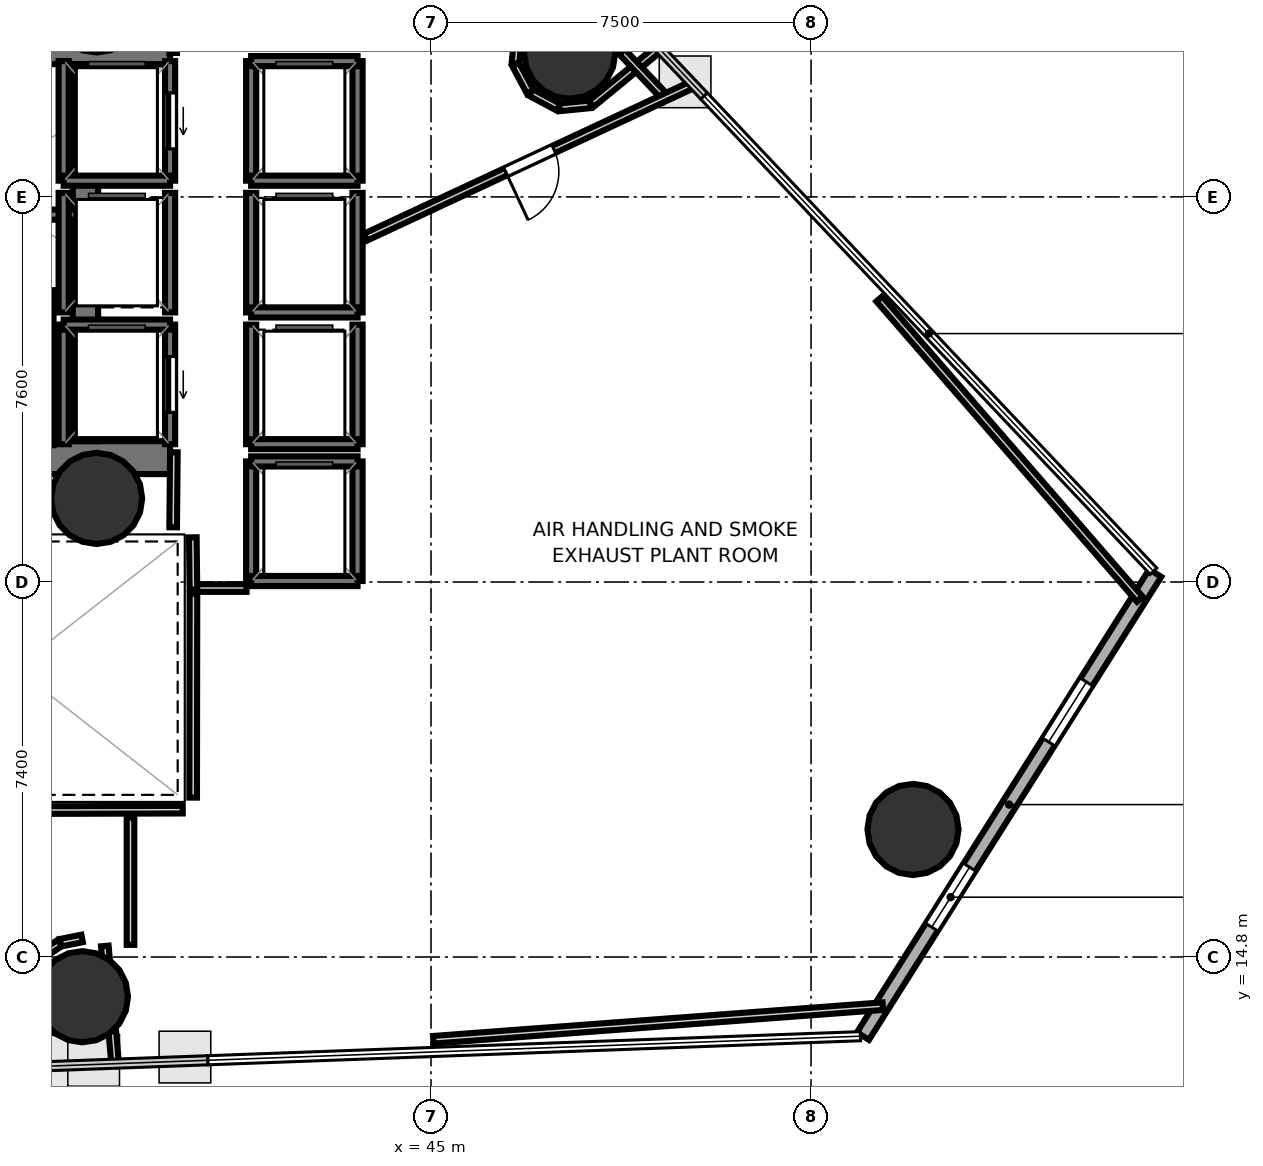
"""IFC4 building model, lengths in metres.
Left out: names, types, materials, properties, quantities, classifications, styles, units other than length and angle.
Written with IfcOpenShell. Run it as: python <this file> out.ifc"""

import sys

from ifc_helpers import new_model, si_unit, direction, frame, frame_2d, origin, origin_2d, place, context, subcontext, project, spatial, rectangle, hollow_circle, extrude, element, fill, save


model = new_model("IFC4")
c1 = context("Model", 3, precision=1e-05, world=origin(), true_north=direction((0.0, 1.0)))
c2 = subcontext(c1, "Body", "Model", "MODEL_VIEW")
j1 = project(units=[si_unit("LENGTHUNIT", "METRE"), si_unit("PLANEANGLEUNIT", "RADIAN")], contexts=[c1])
p1 = place(None, origin())
s1 = spatial("IfcSite", under=j1, at=p1, CompositionType="ELEMENT")
p2 = place(p1, origin())
s2 = spatial("IfcBuilding", under=s1, at=p2, CompositionType="ELEMENT")
p3 = place(p2, frame((0.0, 0.0, 47.9)))
s3 = spatial("IfcBuildingStorey", under=s2, at=p3, CompositionType="ELEMENT", Elevation=47.9)
p4 = place(p3, frame((29.13, 32.745, 0.0), z_axis=(0.0, 0.0, 1.0), x_axis=(1.0, 0.0, 0.0)))
e1 = element("IfcWall", 1, at=p4, inside=s3, PredefinedType="SHEAR", context=c2, shape_type="SweptSolid", body=[
    extrude(rectangle(XDim=10.72, YDim=0.65, at=frame_2d((5.36, 0.0))), origin(), (0.0, 0.0, 1.0), 4.42),
])
p5 = place(p4, frame((1.095, 0.0, 0.0)))
e2 = element("IfcOpeningElement", 2, at=p5, cuts=e1, PredefinedType="OPENING", context=c2, shape_type="SweptSolid", body=[
    extrude(rectangle(XDim=1.25, YDim=2.15, at=frame_2d((0.625, 1.075))), frame((0.0, 0.335, 0.0), z_axis=(0.0, -1.0, 0.0), x_axis=(1.0, 0.0, 0.0)), (0.0, 0.0, 1.0), 0.67),
])
p6 = place(p3, frame((29.13, 24.655, 0.0), z_axis=(0.0, 0.0, 1.0), x_axis=(1.0, 0.0, 0.0)))
e3 = element("IfcWall", 3, at=p6, inside=s3, PredefinedType="SHEAR", context=c2, shape_type="SweptSolid", body=[
    extrude(rectangle(XDim=10.72, YDim=0.65, at=frame_2d((5.36, 0.0))), origin(), (0.0, 0.0, 1.0), 4.42),
])
p7 = place(p6, frame((0.895, 0.0, 0.0)))
e4 = element("IfcOpeningElement", 4, at=p7, cuts=e3, PredefinedType="OPENING", context=c2, shape_type="SweptSolid", body=[
    extrude(rectangle(XDim=1.25, YDim=2.15, at=frame_2d((0.625, 1.075))), frame((0.0, 0.335, 0.0), z_axis=(0.0, -1.0, 0.0), x_axis=(1.0, 0.0, 0.0)), (0.0, 0.0, 1.0), 0.67),
])
p8 = place(p3, frame((38.18, 24.98, 0.0), z_axis=(0.0, 0.0, 1.0), x_axis=(0.0, 1.0, 0.0)))
e5 = element("IfcWall", 5, at=p8, inside=s3, PredefinedType="SHEAR", context=c2, shape_type="SweptSolid", body=[
    extrude(rectangle(XDim=7.44, YDim=0.5, at=frame_2d((3.72, 0.0))), origin(), (0.0, 0.0, 1.0), 4.42),
])
for number, where, z_axis, x_axis in (
    (6, (38.4, 23.85, 0.0), (0.0, 0.0, 1.0), (1.0, 0.0, 0.0)),
    (7, (54.512, 17.317, 0.0), (0.0, 0.0, 1.0), (1.0, 0.0, 0.0)),
    (8, (47.736, 32.637, 0.0), (0.0, 0.0, 1.0), (1.0, 0.0, 0.0)),
    (9, (38.12, 14.016, 0.0), (0.0, 0.0, 1.0), (1.0, 0.0, 0.0)),
):
    element("IfcColumn", number, at=place(p3, frame(where, z_axis=z_axis, x_axis=x_axis)), inside=s3, PredefinedType="COLUMN", context=c2, shape_type="SweptSolid", body=[
        extrude(hollow_circle(Radius=0.9, WallThickness=0.045, at=origin_2d()), origin(), (0.0, 0.0, 1.0), 4.6),
    ])
p9 = place(p3, frame((53.525, 13.239, 0.0), z_axis=(0.0, 0.0, 1.0), x_axis=(0.533819575833, 0.84559840377, 0.0)))
e10 = element("IfcWall", 10, at=p9, inside=s3, PredefinedType="SOLIDWALL", context=c2, shape_type="SweptSolid", body=[
    extrude(rectangle(XDim=10.806, YDim=0.28, at=frame_2d((5.403, 0.0))), origin(), (0.0, 0.0, 1.0), 4.42),
])
p10 = place(p9, frame((2.542, 0.0, 1.0)))
e11 = element("IfcOpeningElement", 11, at=p10, cuts=e10, PredefinedType="OPENING", context=c2, shape_type="SweptSolid", body=[
    extrude(rectangle(XDim=1.4, YDim=1.5, at=frame_2d((0.7, 0.75))), frame((0.0, 0.15, 0.0), z_axis=(0.0, -1.0, 0.0), x_axis=(1.0, 0.0, 0.0)), (0.0, 0.0, 1.0), 0.3),
])
p11 = place(p9, frame((6.865, 0.0, 1.0)))
e12 = element("IfcOpeningElement", 12, at=p11, cuts=e10, PredefinedType="OPENING", context=c2, shape_type="SweptSolid", body=[
    extrude(rectangle(XDim=1.4, YDim=1.5, at=frame_2d((0.7, 0.75))), frame((0.0, 0.15, 0.0), z_axis=(0.0, -1.0, 0.0), x_axis=(1.0, 0.0, 0.0)), (0.0, 0.0, 1.0), 0.3),
])
p12 = place(p3, frame((29.7, 29.45, 0.0), z_axis=(0.0, 0.0, 1.0), x_axis=(1.0, 0.0, 0.0)))
e13 = element("IfcWall", 13, at=p12, inside=s3, PredefinedType="SOLIDWALL", context=c2, shape_type="SweptSolid", body=[
    extrude(rectangle(XDim=8.3, YDim=0.2, at=frame_2d((4.15, 0.0))), origin(), (0.0, 0.0, 1.0), 4.42),
])
p13 = place(p3, frame((37.45, 24.9, 0.0), z_axis=(0.0, 0.0, 1.0), x_axis=(0.0, 1.0, 0.0)))
e14 = element("IfcWall", 14, at=p13, inside=s3, PredefinedType="SOLIDWALL", context=c2, shape_type="SweptSolid", body=[
    extrude(rectangle(XDim=3.06, YDim=0.2, at=frame_2d((1.53, 0.0))), origin(), (0.0, 0.0, 1.0), 4.42),
])
p14 = place(p3, frame((39.85, 30.12, 0.0), z_axis=(0.0, 0.0, 1.0), x_axis=(0.0, 1.0, 0.0)))
e15 = element("IfcWall", 15, at=p14, inside=s3, PredefinedType="SOLIDWALL", context=c2, shape_type="SweptSolid", body=[
    extrude(rectangle(XDim=2.36, YDim=0.2, at=frame_2d((1.18, 0.0))), origin(), (0.0, 0.0, 1.0), 4.42),
])
p15 = place(p14, frame((0.63, 0.0, 0.0)))
e16 = element("IfcOpeningElement", 16, at=p15, cuts=e15, PredefinedType="OPENING", context=c2, shape_type="SweptSolid", body=[
    extrude(rectangle(XDim=1.1, YDim=2.15, at=frame_2d((0.55, 1.075))), frame((0.0, 0.11, 0.0), z_axis=(0.0, -1.0, 0.0), x_axis=(1.0, 0.0, 0.0)), (0.0, 0.0, 1.0), 0.22),
])
p16 = place(p3, frame((37.75, 30.12, 0.0), z_axis=(0.0, 0.0, 1.0), x_axis=(0.0, 1.0, 0.0)))
e17 = element("IfcWall", 17, at=p16, inside=s3, PredefinedType="SOLIDWALL", context=c2, shape_type="SweptSolid", body=[
    extrude(rectangle(XDim=2.36, YDim=0.2, at=frame_2d((1.18, 0.0))), origin(), (0.0, 0.0, 1.0), 4.42),
])
p17 = place(p3, frame((37.75, 30.12, 0.0), z_axis=(0.0, 0.0, 1.0), x_axis=(1.0, 0.0, 0.0)))
e18 = element("IfcWall", 18, at=p17, inside=s3, PredefinedType="SOLIDWALL", context=c2, shape_type="SweptSolid", body=[
    extrude(rectangle(XDim=2.1, YDim=0.2, at=frame_2d((1.05, 0.0))), origin(), (0.0, 0.0, 1.0), 4.42),
])
p18 = place(p3, frame((39.85, 24.92, 0.0), z_axis=(0.0, 0.0, 1.0), x_axis=(0.0, 1.0, 0.0)))
e19 = element("IfcWall", 19, at=p18, inside=s3, PredefinedType="SOLIDWALL", context=c2, shape_type="SweptSolid", body=[
    extrude(rectangle(XDim=2.36, YDim=0.2, at=frame_2d((1.18, 0.0))), origin(), (0.0, 0.0, 1.0), 4.42),
])
p19 = place(p18, frame((0.63, 0.0, 0.0)))
e20 = element("IfcOpeningElement", 20, at=p19, cuts=e19, PredefinedType="OPENING", context=c2, shape_type="SweptSolid", body=[
    extrude(rectangle(XDim=1.1, YDim=2.15, at=frame_2d((0.55, 1.075))), frame((0.0, 0.11, 0.0), z_axis=(0.0, -1.0, 0.0), x_axis=(1.0, 0.0, 0.0)), (0.0, 0.0, 1.0), 0.22),
])
p20 = place(p3, frame((37.75, 24.92, 0.0), z_axis=(0.0, 0.0, 1.0), x_axis=(0.0, 1.0, 0.0)))
e21 = element("IfcWall", 21, at=p20, inside=s3, PredefinedType="SOLIDWALL", context=c2, shape_type="SweptSolid", body=[
    extrude(rectangle(XDim=2.36, YDim=0.2, at=frame_2d((1.18, 0.0))), origin(), (0.0, 0.0, 1.0), 4.42),
])
p21 = place(p3, frame((37.75, 27.28, 0.0), z_axis=(0.0, 0.0, 1.0), x_axis=(1.0, 0.0, 0.0)))
e22 = element("IfcWall", 22, at=p21, inside=s3, PredefinedType="SOLIDWALL", context=c2, shape_type="SweptSolid", body=[
    extrude(rectangle(XDim=2.1, YDim=0.2, at=frame_2d((1.05, 0.0))), origin(), (0.0, 0.0, 1.0), 4.42),
])
for number, where, z_axis, x_axis in (
    (23, (43.55, 30.12, 0.0), (0.0, 0.0, 1.0), (0.0, 1.0, 0.0)),
    (24, (41.45, 30.12, 0.0), (0.0, 0.0, 1.0), (0.0, 1.0, 0.0)),
):
    element("IfcWall", number, at=place(p3, frame(where, z_axis=z_axis, x_axis=x_axis)), inside=s3, PredefinedType="SOLIDWALL", context=c2, shape_type="SweptSolid", body=[
        extrude(rectangle(XDim=2.36, YDim=0.2, at=frame_2d((1.18, 0.0))), origin(), (0.0, 0.0, 1.0), 4.42),
    ])
for number, where, z_axis, x_axis in (
    (25, (41.45, 32.48, 0.0), (0.0, 0.0, 1.0), (1.0, 0.0, 0.0)),
    (26, (41.45, 30.12, 0.0), (0.0, 0.0, 1.0), (1.0, 0.0, 0.0)),
):
    element("IfcWall", number, at=place(p3, frame(where, z_axis=z_axis, x_axis=x_axis)), inside=s3, PredefinedType="SOLIDWALL", context=c2, shape_type="SweptSolid", body=[
        extrude(rectangle(XDim=2.1, YDim=0.2, at=frame_2d((1.05, 0.0))), origin(), (0.0, 0.0, 1.0), 4.42),
    ])
for number, where, z_axis, x_axis in (
    (27, (43.55, 27.52, 0.0), (0.0, 0.0, 1.0), (0.0, 1.0, 0.0)),
    (28, (41.45, 27.52, 0.0), (0.0, 0.0, 1.0), (0.0, 1.0, 0.0)),
):
    element("IfcWall", number, at=place(p3, frame(where, z_axis=z_axis, x_axis=x_axis)), inside=s3, PredefinedType="SOLIDWALL", context=c2, shape_type="SweptSolid", body=[
        extrude(rectangle(XDim=2.36, YDim=0.2, at=frame_2d((1.18, 0.0))), origin(), (0.0, 0.0, 1.0), 4.42),
    ])
p22 = place(p3, frame((41.45, 27.52, 0.0), z_axis=(0.0, 0.0, 1.0), x_axis=(1.0, 0.0, 0.0)))
e29 = element("IfcWall", 29, at=p22, inside=s3, PredefinedType="SOLIDWALL", context=c2, shape_type="SweptSolid", body=[
    extrude(rectangle(XDim=2.1, YDim=0.2, at=frame_2d((1.05, 0.0))), origin(), (0.0, 0.0, 1.0), 4.42),
])
for number, where, z_axis, x_axis in (
    (30, (43.55, 24.92, 0.0), (0.0, 0.0, 1.0), (0.0, 1.0, 0.0)),
    (31, (41.45, 24.92, 0.0), (0.0, 0.0, 1.0), (0.0, 1.0, 0.0)),
):
    element("IfcWall", number, at=place(p3, frame(where, z_axis=z_axis, x_axis=x_axis)), inside=s3, PredefinedType="SOLIDWALL", context=c2, shape_type="SweptSolid", body=[
        extrude(rectangle(XDim=2.36, YDim=0.2, at=frame_2d((1.18, 0.0))), origin(), (0.0, 0.0, 1.0), 4.42),
    ])
p23 = place(p3, frame((41.45, 24.92, 0.0), z_axis=(0.0, 0.0, 1.0), x_axis=(1.0, 0.0, 0.0)))
e32 = element("IfcWall", 32, at=p23, inside=s3, PredefinedType="SOLIDWALL", context=c2, shape_type="SweptSolid", body=[
    extrude(rectangle(XDim=2.1, YDim=0.2, at=frame_2d((1.05, 0.0))), origin(), (0.0, 0.0, 1.0), 4.42),
])
for number, where, z_axis, x_axis in (
    (33, (39.85, 27.52, 0.0), (0.0, 0.0, 1.0), (0.0, 1.0, 0.0)),
    (34, (37.75, 27.52, 0.0), (0.0, 0.0, 1.0), (0.0, 1.0, 0.0)),
):
    element("IfcWall", number, at=place(p3, frame(where, z_axis=z_axis, x_axis=x_axis)), inside=s3, PredefinedType="SOLIDWALL", context=c2, shape_type="SweptSolid", body=[
        extrude(rectangle(XDim=2.36, YDim=0.2, at=frame_2d((1.18, 0.0))), origin(), (0.0, 0.0, 1.0), 4.42),
    ])
for number, where, z_axis, x_axis in (
    (35, (43.55, 22.22, 0.0), (0.0, 0.0, 1.0), (0.0, 1.0, 0.0)),
    (36, (41.45, 22.22, 0.0), (0.0, 0.0, 1.0), (0.0, 1.0, 0.0)),
):
    element("IfcWall", number, at=place(p3, frame(where, z_axis=z_axis, x_axis=x_axis)), inside=s3, PredefinedType="SOLIDWALL", context=c2, shape_type="SweptSolid", body=[
        extrude(rectangle(XDim=2.36, YDim=0.2, at=frame_2d((1.18, 0.0))), origin(), (0.0, 0.0, 1.0), 4.42),
    ])
for number, where, z_axis, x_axis in (
    (37, (41.45, 24.58, 0.0), (0.0, 0.0, 1.0), (1.0, 0.0, 0.0)),
    (38, (41.45, 22.22, 0.0), (0.0, 0.0, 1.0), (1.0, 0.0, 0.0)),
):
    element("IfcWall", number, at=place(p3, frame(where, z_axis=z_axis, x_axis=x_axis)), inside=s3, PredefinedType="SOLIDWALL", context=c2, shape_type="SweptSolid", body=[
        extrude(rectangle(XDim=2.1, YDim=0.2, at=frame_2d((1.05, 0.0))), origin(), (0.0, 0.0, 1.0), 4.42),
    ])
p24 = place(p3, frame((39.911, 32.64, 0.0), z_axis=(0.0, 0.0, 1.0), x_axis=(0.0, 1.0, 0.0)))
e39 = element("IfcWall", 39, at=p24, inside=s3, PredefinedType="PARTITIONING", context=c2, shape_type="SweptSolid", body=[
    extrude(rectangle(XDim=4.01, YDim=0.15, at=frame_2d((2.005, 0.0))), origin(), (0.0, 0.0, 1.0), 2.94),
])
p25 = place(p24, frame((1.93, 0.0, 0.0)))
e40 = element("IfcOpeningElement", 40, at=p25, cuts=e39, PredefinedType="OPENING", context=c2, shape_type="SweptSolid", body=[
    extrude(rectangle(XDim=0.86, YDim=2.05, at=frame_2d((0.43, 1.025))), frame((0.0, 0.085, 0.0), z_axis=(0.0, -1.0, 0.0), x_axis=(1.0, 0.0, 0.0)), (0.0, 0.0, 1.0), 0.17),
])
p26 = place(p3, frame((41.36, 22.081, 0.0), z_axis=(0.0, 0.0, 1.0), x_axis=(-1.0, 0.0, 0.0)))
e41 = element("IfcWall", 41, at=p26, inside=s3, PredefinedType="PARTITIONING", context=c2, shape_type="SweptSolid", body=[
    extrude(rectangle(XDim=1.08, YDim=0.15, at=frame_2d((0.54, 0.0))), origin(), (0.0, 0.0, 1.0), 2.94),
])
p27 = place(p3, frame((40.311, 22.05, 0.0), z_axis=(0.0, 0.0, 1.0), x_axis=(-0.011836292006, 0.999929948642, 0.0)))
e42 = element("IfcWall", 42, at=p27, inside=s3, PredefinedType="PARTITIONING", context=c2, shape_type="SweptSolid", body=[
    extrude(rectangle(XDim=1.031, YDim=0.15, at=frame_2d((0.516, 0.0))), origin(), (0.0, 0.0, 1.0), 2.94),
])
p28 = place(p3, frame((39.911, 23.28, 0.0), z_axis=(0.0, 0.0, 1.0), x_axis=(0.009397771291, 0.999955839972, 0.0)))
e43 = element("IfcWall", 43, at=p28, inside=s3, PredefinedType="PARTITIONING", context=c2, shape_type="SweptSolid", body=[
    extrude(rectangle(XDim=1.481, YDim=0.15, at=frame_2d((0.74, 0.0))), origin(), (0.0, 0.0, 1.0), 2.94),
])
p29 = place(p3, frame((33.6, 17.689, 0.0), z_axis=(0.0, 0.0, 1.0), x_axis=(0.999995817826, 0.002892115308, 0.0)))
e44 = element("IfcWall", 44, at=p29, inside=s3, PredefinedType="PARTITIONING", context=c2, shape_type="SweptSolid", body=[
    extrude(rectangle(XDim=6.5, YDim=0.15, at=frame_2d((3.25, 0.0))), origin(), (0.0, 0.0, 1.0), 2.94),
])
p30 = place(p3, frame((39.069, 17.55, 0.0), z_axis=(0.0, 0.0, 1.0), x_axis=(0.0, -1.0, 0.0)))
e45 = element("IfcWall", 45, at=p30, inside=s3, PredefinedType="PARTITIONING", context=c2, shape_type="SweptSolid", body=[
    extrude(rectangle(XDim=2.51, YDim=0.15, at=frame_2d((1.255, 0.0))), origin(), (0.0, 0.0, 1.0), 2.94),
])
p31 = place(p3, frame((38.114, 15.167, 0.0), z_axis=(0.0, 0.0, 1.0), x_axis=(-0.980709346372, -0.195471680655, 0.0)))
e46 = element("IfcWall", 46, at=p31, inside=s3, PredefinedType="PARTITIONING", context=c2, shape_type="SweptSolid", body=[
    extrude(rectangle(XDim=0.437, YDim=0.15, at=frame_2d((0.219, 0.0))), origin(), (0.0, 0.0, 1.0), 2.94),
])
p32 = place(p3, frame((37.674, 15.076, 0.0), z_axis=(0.0, 0.0, 1.0), x_axis=(-0.83170640099, -0.555215690117, 0.0)))
e47 = element("IfcWall", 47, at=p32, inside=s3, PredefinedType="PARTITIONING", context=c2, shape_type="SweptSolid", body=[
    extrude(rectangle(XDim=0.437, YDim=0.15, at=frame_2d((0.219, 0.0))), origin(), (0.0, 0.0, 1.0), 2.94),
])
for number, where, z_axis, x_axis in (
    (48, (46.726, 33.046, 0.0), (0.0, 0.0, 1.0), (-0.098, -0.995, 0.0)),
    (49, (46.669, 32.416, 0.0), (0.0, 0.0, 1.0), (0.471, -0.882, 0.0)),
    (50, (46.972, 31.86, 0.0), (0.0, 0.0, 1.0), (0.882, -0.471, 0.0)),
    (51, (47.532, 31.566, 0.0), (0.0, 0.0, 1.0), (0.995, 0.098, 0.0)),
):
    element("IfcWall", number, at=place(p3, frame(where, z_axis=z_axis, x_axis=x_axis)), inside=s3, PredefinedType="PARTITIONING", context=c2, shape_type="SweptSolid", body=[
        extrude(rectangle(XDim=0.615, YDim=0.15, at=frame_2d((0.308, 0.0))), origin(), (0.0, 0.0, 1.0), 2.94),
    ])
p33 = place(p3, frame((48.161, 31.634, 0.0), z_axis=(0.0, 0.0, 1.0), x_axis=(0.773024260779, 0.634376459405, 0.0)))
e52 = element("IfcWall", 52, at=p33, inside=s3, PredefinedType="PARTITIONING", context=c2, shape_type="SweptSolid", body=[
    extrude(rectangle(XDim=1.75, YDim=0.15, at=frame_2d((0.875, 0.0))), origin(), (0.0, 0.0, 1.0), 2.94),
])
p34 = place(p3, frame((48.769, 32.666, 0.0), z_axis=(0.0, 0.0, 1.0), x_axis=(0.687254085854, -0.726417112599, 0.0)))
e53 = element("IfcWall", 53, at=p34, inside=s3, PredefinedType="PARTITIONING", context=c2, shape_type="SweptSolid", body=[
    extrude(rectangle(XDim=1.284, YDim=0.15, at=frame_2d((0.642, 0.0))), origin(), (0.0, 0.0, 1.0), 2.94),
])
p35 = place(p3, frame((50.19, 32.029, 0.0), z_axis=(0.0, 0.0, 1.0), x_axis=(-0.906312147514, -0.422608910541, 0.0)))
e54 = element("IfcWall", 54, at=p35, inside=s3, PredefinedType="PARTITIONING", context=c2, shape_type="SweptSolid", body=[
    extrude(rectangle(XDim=7.153, YDim=0.15, at=frame_2d((3.577, 0.0))), origin(), (0.0, 0.0, 1.0), 2.94),
])
p36 = place(p35, frame((3.052, 0.0, 0.0)))
e55 = element("IfcOpeningElement", 55, at=p36, cuts=e54, PredefinedType="OPENING", context=c2, shape_type="SweptSolid", body=[
    extrude(rectangle(XDim=1.05, YDim=2.15, at=frame_2d((0.525, 1.075))), frame((0.0, 0.085, 0.0), z_axis=(0.0, -1.0, 0.0), x_axis=(1.0, 0.0, 0.0)), (0.0, 0.0, 1.0), 0.17),
])
p37 = place(p3, frame((40.306, 17.945, 0.0), z_axis=(0.0, 0.0, 1.0), x_axis=(0.001334545369, 0.999999109494, 0.0)))
e56 = element("IfcWall", 56, at=p37, inside=s3, PredefinedType="PARTITIONING", context=c2, shape_type="SweptSolid", body=[
    extrude(rectangle(XDim=4.025, YDim=0.15, at=frame_2d((2.012, 0.0))), origin(), (0.0, 0.0, 1.0), 2.94),
])
p38 = place(p3, frame((53.846, 27.787, 0.0), z_axis=(0.0, 0.0, 1.0), x_axis=(0.655442058085, -0.755245462411, 0.0)))
e57 = element("IfcWall", 57, at=p38, inside=s3, PredefinedType="PARTITIONING", context=c2, shape_type="SweptSolid", body=[
    extrude(rectangle(XDim=7.847, YDim=0.15, at=frame_2d((3.924, 0.0))), origin(), (0.0, 0.0, 1.0), 2.94),
])
p39 = place(p3, frame((53.917, 13.83, 0.0), z_axis=(0.0, 0.0, 1.0), x_axis=(-0.997215248763, -0.074577125416, 0.0)))
e58 = element("IfcWall", 58, at=p39, inside=s3, PredefinedType="PARTITIONING", context=c2, shape_type="SweptSolid", body=[
    extrude(rectangle(XDim=8.898, YDim=0.15, at=frame_2d((4.449, 0.0))), origin(), (0.0, 0.0, 1.0), 2.94),
])
p40 = place(p3, frame((38.767, 12.675, 0.0), z_axis=(0.0, 0.0, 1.0), x_axis=(-0.087193991338, 0.996191351034, 0.0)))
e59 = element("IfcWall", 59, at=p40, inside=s3, PredefinedType="PARTITIONING", context=c2, shape_type="SweptSolid", body=[
    extrude(rectangle(XDim=2.352, YDim=0.15, at=frame_2d((1.176, 0.0))), origin(), (0.0, 0.0, 1.0), 2.94),
])
p41 = place(p15, origin())
e60 = element("IfcDoor", 60, at=p41, inside=s3, OperationType="SLIDING_TO_LEFT", PredefinedType="DOOR", context=c2, shape_type="SweptSolid", body=[
    extrude(rectangle(XDim=1.1, YDim=2.15, at=frame_2d((0.55, 1.075))), frame((0.0, 0.025, 0.0), z_axis=(0.0, -1.0, 0.0), x_axis=(1.0, 0.0, 0.0)), (0.0, 0.0, 1.0), 0.05),
])
fill(e16, e60)
p42 = place(p19, origin())
e61 = element("IfcDoor", 61, at=p42, inside=s3, OperationType="SLIDING_TO_LEFT", PredefinedType="DOOR", context=c2, shape_type="SweptSolid", body=[
    extrude(rectangle(XDim=1.1, YDim=2.15, at=frame_2d((0.55, 1.075))), frame((0.0, 0.025, 0.0), z_axis=(0.0, -1.0, 0.0), x_axis=(1.0, 0.0, 0.0)), (0.0, 0.0, 1.0), 0.05),
])
fill(e20, e61)
p43 = place(p36, origin())
e62 = element("IfcDoor", 62, at=p43, inside=s3, OperationType="SINGLE_SWING_RIGHT", PredefinedType="DOOR", context=c2, shape_type="SweptSolid", body=[
    extrude(rectangle(XDim=1.05, YDim=2.15, at=frame_2d((0.525, 1.075))), frame((0.0, 0.025, 0.0), z_axis=(0.0, -1.0, 0.0), x_axis=(1.0, 0.0, 0.0)), (0.0, 0.0, 1.0), 0.05),
])
fill(e55, e62)
p44 = place(p10, origin())
e63 = element("IfcWindow", 63, at=p44, inside=s3, PartitioningType="SINGLE_PANEL", PredefinedType="WINDOW", context=c2, shape_type="SweptSolid", body=[
    extrude(rectangle(XDim=1.4, YDim=1.5, at=frame_2d((0.7, 0.75))), frame((0.0, 0.03, 0.0), z_axis=(0.0, -1.0, 0.0), x_axis=(1.0, 0.0, 0.0)), (0.0, 0.0, 1.0), 0.06),
])
fill(e11, e63)
p45 = place(p11, origin())
e64 = element("IfcWindow", 64, at=p45, inside=s3, PartitioningType="SINGLE_PANEL", PredefinedType="WINDOW", context=c2, shape_type="SweptSolid", body=[
    extrude(rectangle(XDim=1.4, YDim=1.5, at=frame_2d((0.7, 0.75))), frame((0.0, 0.03, 0.0), z_axis=(0.0, -1.0, 0.0), x_axis=(1.0, 0.0, 0.0)), (0.0, 0.0, 1.0), 0.06),
])
fill(e12, e64)
save(model, sys.argv[1])
